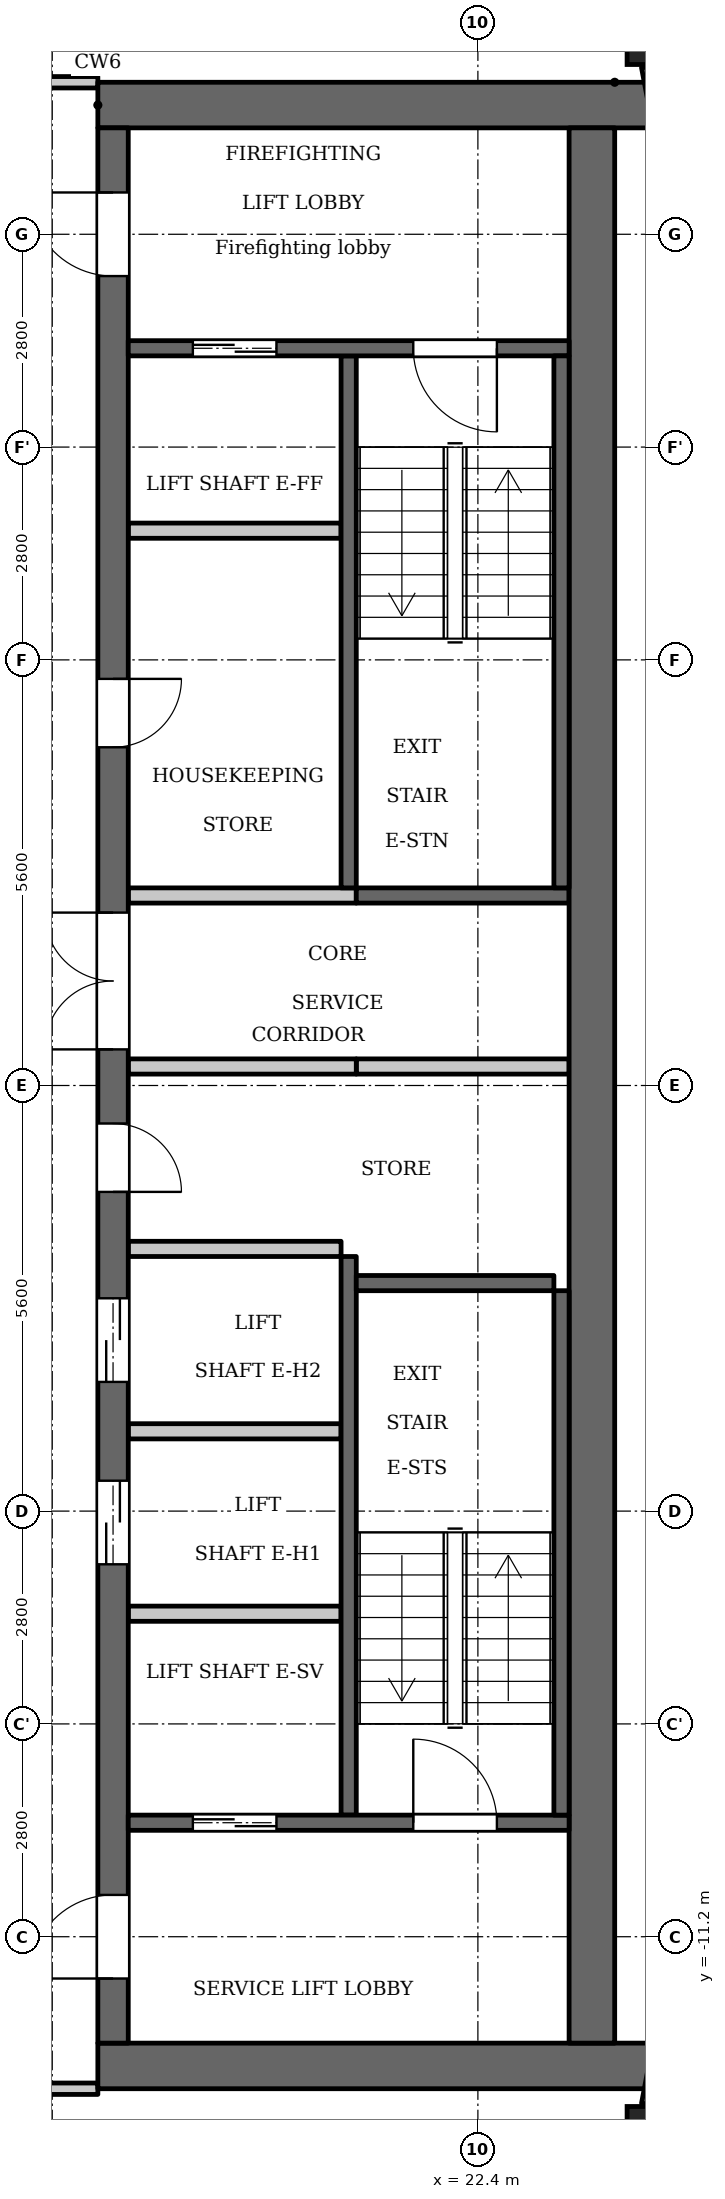
"""IFC4 building model, lengths in metres.
Left out: names, types, materials, properties, quantities, classifications, styles, units other than length and angle.
Written with IfcOpenShell. Run it as: python <this file> out.ifc"""

import sys

from ifc_helpers import new_model, si_unit, direction, frame, frame_2d, origin, origin_2d, place, context, subcontext, project, spatial, rectangle, extrude, element, fill, save


model = new_model("IFC4")
c1 = context("Model", 3, precision=1e-05, world=origin(), true_north=direction((0.0, 1.0)))
c2 = subcontext(c1, "Body", "Model", "MODEL_VIEW")
j1 = project(units=[si_unit("LENGTHUNIT", "METRE"), si_unit("PLANEANGLEUNIT", "RADIAN")], contexts=[c1])
p1 = place(None, origin())
s1 = spatial("IfcSite", under=j1, at=p1, CompositionType="ELEMENT")
p2 = place(p1, origin())
s2 = spatial("IfcBuilding", under=s1, at=p2, CompositionType="ELEMENT")
p3 = place(p2, frame((0.0, 0.0, 273.2)))
s3 = spatial("IfcBuildingStorey", under=s2, at=p3, CompositionType="ELEMENT", Elevation=273.2)
for number, where, z_axis, x_axis in (
    (1, (24.738, -13.809, 0.0), (0.0, 0.0, 1.0), (1.0, 0.0, 0.0)),
    (2, (24.738, 13.809, 0.0), (0.0, 0.0, 1.0), (1.0, 0.0, 0.0)),
):
    element("IfcColumn", number, at=place(p3, frame(where, z_axis=z_axis, x_axis=x_axis)), inside=s3, PredefinedType="COLUMN", context=c2, shape_type="SweptSolid", body=[
        extrude(rectangle(XDim=0.75, YDim=0.75, at=origin_2d()), origin(), (0.0, 0.0, 1.0), 3.5),
    ])
for number, where, z_axis, x_axis in (
    (3, (24.7, -13.42, 0.0), (0.0, 0.0, 1.0), (0.187, 0.982, 0.0)),
    (4, (25.053, 11.572, 0.0), (0.0, 0.0, 1.0), (-0.187, 0.982, 0.0)),
):
    element("IfcWall", number, at=place(p3, frame(where, z_axis=z_axis, x_axis=x_axis)), inside=s3, PredefinedType="SOLIDWALL", context=c2, shape_type="SweptSolid", body=[
        extrude(rectangle(XDim=1.881, YDim=0.3, at=frame_2d((0.941, 0.0))), origin(), (0.0, 0.0, 1.0), 2.55),
    ])
p4 = place(p3, frame((20.7, 2.6, 0.0), z_axis=(0.0, 0.0, 1.0), x_axis=(0.0, 1.0, 0.0)))
e5 = element("IfcWall", 5, at=p4, inside=s3, PredefinedType="SHEAR", context=c2, shape_type="SweptSolid", body=[
    extrude(rectangle(XDim=7.0, YDim=0.2, at=frame_2d((3.5, 0.0))), origin(), (0.0, 0.0, 1.0), 3.2),
])
p5 = place(p3, frame((20.7, -9.6, 0.0), z_axis=(0.0, 0.0, 1.0), x_axis=(0.0, 1.0, 0.0)))
e6 = element("IfcWall", 6, at=p5, inside=s3, PredefinedType="SHEAR", context=c2, shape_type="SweptSolid", body=[
    extrude(rectangle(XDim=7.35, YDim=0.2, at=frame_2d((3.675, 0.0))), origin(), (0.0, 0.0, 1.0), 3.2),
])
p6 = place(p3, frame((20.8, 2.5, 0.0), z_axis=(0.0, 0.0, 1.0), x_axis=(1.0, 0.0, 0.0)))
e7 = element("IfcWall", 7, at=p6, inside=s3, PredefinedType="SHEAR", context=c2, shape_type="SweptSolid", body=[
    extrude(rectangle(XDim=2.8, YDim=0.2, at=frame_2d((1.4, 0.0))), origin(), (0.0, 0.0, 1.0), 3.2),
])
p7 = place(p3, frame((20.8, 0.25, 0.0), z_axis=(0.0, 0.0, 1.0), x_axis=(1.0, 0.0, 0.0)))
e8 = element("IfcWall", 8, at=p7, inside=s3, PredefinedType="PARTITIONING", context=c2, shape_type="SweptSolid", body=[
    extrude(rectangle(XDim=2.8, YDim=0.2, at=frame_2d((1.4, 0.0))), origin(), (0.0, 0.0, 1.0), 3.2),
])
for number, where, z_axis, x_axis in (
    (9, (17.4, 12.9, 0.0), (0.0, 0.0, 1.0), (1.0, 0.0, 0.0)),
    (10, (17.4, -12.9, 0.0), (0.0, 0.0, 1.0), (1.0, 0.0, 0.0)),
):
    element("IfcWall", number, at=place(p3, frame(where, z_axis=z_axis, x_axis=x_axis)), inside=s3, PredefinedType="SHEAR", context=c2, shape_type="SweptSolid", body=[
        extrude(rectangle(XDim=7.32, YDim=0.6, at=frame_2d((3.66, 0.0))), origin(), (0.0, 0.0, 1.0), 3.2),
    ])
p8 = place(p3, frame((17.6, -12.6, 0.0), z_axis=(0.0, 0.0, 1.0), x_axis=(0.0, 1.0, 0.0)))
e11 = element("IfcWall", 11, at=p8, inside=s3, PredefinedType="SHEAR", context=c2, shape_type="SweptSolid", body=[
    extrude(rectangle(XDim=25.2, YDim=0.4, at=frame_2d((12.6, 0.0))), origin(), (0.0, 0.0, 1.0), 3.2),
])
p9 = place(p8, frame((6.3, 0.0, 0.0)))
e12 = element("IfcOpeningElement", 12, at=p9, cuts=e11, PredefinedType="OPENING", context=c2, shape_type="SweptSolid", body=[
    extrude(rectangle(XDim=1.1, YDim=2.1, at=frame_2d((0.55, 1.05))), frame((0.0, 0.21, 0.0), z_axis=(0.0, -1.0, 0.0), x_axis=(1.0, 0.0, 0.0)), (0.0, 0.0, 1.0), 0.42),
])
p10 = place(p8, frame((8.7, 0.0, 0.0)))
e13 = element("IfcOpeningElement", 13, at=p10, cuts=e11, PredefinedType="OPENING", context=c2, shape_type="SweptSolid", body=[
    extrude(rectangle(XDim=1.1, YDim=2.1, at=frame_2d((0.55, 1.05))), frame((0.0, 0.21, 0.0), z_axis=(0.0, -1.0, 0.0), x_axis=(1.0, 0.0, 0.0)), (0.0, 0.0, 1.0), 0.42),
])
p11 = place(p8, frame((11.2, 0.0, 0.0)))
e14 = element("IfcOpeningElement", 14, at=p11, cuts=e11, PredefinedType="OPENING", context=c2, shape_type="SweptSolid", body=[
    extrude(rectangle(XDim=0.9, YDim=2.1, at=frame_2d((0.45, 1.05))), frame((0.0, 0.21, 0.0), z_axis=(0.0, -1.0, 0.0), x_axis=(1.0, 0.0, 0.0)), (0.0, 0.0, 1.0), 0.42),
])
p12 = place(p8, frame((17.05, 0.0, 0.0)))
e15 = element("IfcOpeningElement", 15, at=p12, cuts=e11, PredefinedType="OPENING", context=c2, shape_type="SweptSolid", body=[
    extrude(rectangle(XDim=0.9, YDim=2.1, at=frame_2d((0.45, 1.05))), frame((0.0, 0.21, 0.0), z_axis=(0.0, -1.0, 0.0), x_axis=(1.0, 0.0, 0.0)), (0.0, 0.0, 1.0), 0.42),
])
p13 = place(p8, frame((23.25, 0.0, 0.0)))
e16 = element("IfcOpeningElement", 16, at=p13, cuts=e11, PredefinedType="OPENING", context=c2, shape_type="SweptSolid", body=[
    extrude(rectangle(XDim=1.1, YDim=2.1, at=frame_2d((0.55, 1.05))), frame((0.0, 0.21, 0.0), z_axis=(0.0, -1.0, 0.0), x_axis=(1.0, 0.0, 0.0)), (0.0, 0.0, 1.0), 0.42),
])
p14 = place(p8, frame((0.85, 0.0, 0.0)))
e17 = element("IfcOpeningElement", 17, at=p14, cuts=e11, PredefinedType="OPENING", context=c2, shape_type="SweptSolid", body=[
    extrude(rectangle(XDim=1.1, YDim=2.1, at=frame_2d((0.55, 1.05))), frame((0.0, 0.21, 0.0), z_axis=(0.0, -1.0, 0.0), x_axis=(1.0, 0.0, 0.0)), (0.0, 0.0, 1.0), 0.42),
])
p15 = place(p8, frame((13.075, 0.0, 0.0)))
e18 = element("IfcOpeningElement", 18, at=p15, cuts=e11, PredefinedType="OPENING", context=c2, shape_type="SweptSolid", body=[
    extrude(rectangle(XDim=1.8, YDim=2.1, at=frame_2d((0.9, 1.05))), frame((0.0, 0.21, 0.0), z_axis=(0.0, -1.0, 0.0), x_axis=(1.0, 0.0, 0.0)), (0.0, 0.0, 1.0), 0.42),
])
p16 = place(p3, frame((23.9, -12.6, 0.0), z_axis=(0.0, 0.0, 1.0), x_axis=(0.0, 1.0, 0.0)))
e19 = element("IfcWall", 19, at=p16, inside=s3, PredefinedType="SHEAR", context=c2, shape_type="SweptSolid", body=[
    extrude(rectangle(XDim=25.2, YDim=0.6, at=frame_2d((12.6, 0.0))), origin(), (0.0, 0.0, 1.0), 3.2),
])
p17 = place(p3, frame((17.8, -9.7, 0.0), z_axis=(0.0, 0.0, 1.0), x_axis=(1.0, 0.0, 0.0)))
e20 = element("IfcWall", 20, at=p17, inside=s3, PredefinedType="SHEAR", context=c2, shape_type="SweptSolid", body=[
    extrude(rectangle(XDim=5.8, YDim=0.2, at=frame_2d((2.9, 0.0))), origin(), (0.0, 0.0, 1.0), 3.2),
])
p18 = place(p17, frame((0.85, 0.0, 0.0)))
e21 = element("IfcOpeningElement", 21, at=p18, cuts=e20, PredefinedType="OPENING", context=c2, shape_type="SweptSolid", body=[
    extrude(rectangle(XDim=1.1, YDim=2.1, at=frame_2d((0.55, 1.05))), frame((0.0, 0.11, 0.0), z_axis=(0.0, -1.0, 0.0), x_axis=(1.0, 0.0, 0.0)), (0.0, 0.0, 1.0), 0.22),
])
p19 = place(p17, frame((3.75, 0.0, 0.0)))
e22 = element("IfcOpeningElement", 22, at=p19, cuts=e20, PredefinedType="OPENING", context=c2, shape_type="SweptSolid", body=[
    extrude(rectangle(XDim=1.1, YDim=2.1, at=frame_2d((0.55, 1.05))), frame((0.0, 0.11, 0.0), z_axis=(0.0, -1.0, 0.0), x_axis=(1.0, 0.0, 0.0)), (0.0, 0.0, 1.0), 0.22),
])
for number, where, z_axis, x_axis in (
    (23, (17.8, -6.95, 0.0), (0.0, 0.0, 1.0), (1.0, 0.0, 0.0)),
    (24, (17.8, -4.55, 0.0), (0.0, 0.0, 1.0), (1.0, 0.0, 0.0)),
    (25, (17.8, -2.15, 0.0), (0.0, 0.0, 1.0), (1.0, 0.0, 0.0)),
):
    element("IfcWall", number, at=place(p3, frame(where, z_axis=z_axis, x_axis=x_axis)), inside=s3, PredefinedType="PARTITIONING", context=c2, shape_type="SweptSolid", body=[
        extrude(rectangle(XDim=2.8, YDim=0.2, at=frame_2d((1.4, 0.0))), origin(), (0.0, 0.0, 1.0), 3.2),
    ])
for number, where, z_axis, x_axis in (
    (26, (17.8, 0.25, 0.0), (0.0, 0.0, 1.0), (1.0, 0.0, 0.0)),
    (27, (17.8, 2.5, 0.0), (0.0, 0.0, 1.0), (1.0, 0.0, 0.0)),
):
    element("IfcWall", number, at=place(p3, frame(where, z_axis=z_axis, x_axis=x_axis)), inside=s3, PredefinedType="PARTITIONING", context=c2, shape_type="SweptSolid", body=[
        extrude(rectangle(XDim=3.0, YDim=0.2, at=frame_2d((1.5, 0.0))), origin(), (0.0, 0.0, 1.0), 3.2),
    ])
p20 = place(p3, frame((17.8, 7.3, 0.0), z_axis=(0.0, 0.0, 1.0), x_axis=(1.0, 0.0, 0.0)))
e28 = element("IfcWall", 28, at=p20, inside=s3, PredefinedType="PARTITIONING", context=c2, shape_type="SweptSolid", body=[
    extrude(rectangle(XDim=2.8, YDim=0.2, at=frame_2d((1.4, 0.0))), origin(), (0.0, 0.0, 1.0), 3.2),
])
p21 = place(p3, frame((17.8, 9.7, 0.0), z_axis=(0.0, 0.0, 1.0), x_axis=(1.0, 0.0, 0.0)))
e29 = element("IfcWall", 29, at=p21, inside=s3, PredefinedType="SHEAR", context=c2, shape_type="SweptSolid", body=[
    extrude(rectangle(XDim=5.8, YDim=0.2, at=frame_2d((2.9, 0.0))), origin(), (0.0, 0.0, 1.0), 3.2),
])
p22 = place(p21, frame((0.85, 0.0, 0.0)))
e30 = element("IfcOpeningElement", 30, at=p22, cuts=e29, PredefinedType="OPENING", context=c2, shape_type="SweptSolid", body=[
    extrude(rectangle(XDim=1.1, YDim=2.1, at=frame_2d((0.55, 1.05))), frame((0.0, 0.11, 0.0), z_axis=(0.0, -1.0, 0.0), x_axis=(1.0, 0.0, 0.0)), (0.0, 0.0, 1.0), 0.22),
])
p23 = place(p21, frame((3.75, 0.0, 0.0)))
e31 = element("IfcOpeningElement", 31, at=p23, cuts=e29, PredefinedType="OPENING", context=c2, shape_type="SweptSolid", body=[
    extrude(rectangle(XDim=1.1, YDim=2.1, at=frame_2d((0.55, 1.05))), frame((0.0, 0.11, 0.0), z_axis=(0.0, -1.0, 0.0), x_axis=(1.0, 0.0, 0.0)), (0.0, 0.0, 1.0), 0.22),
])
p24 = place(p3, frame((23.5, 2.6, 0.0), z_axis=(0.0, 0.0, 1.0), x_axis=(0.0, 1.0, 0.0)))
e32 = element("IfcWall", 32, at=p24, inside=s3, PredefinedType="SHEAR", context=c2, shape_type="SweptSolid", body=[
    extrude(rectangle(XDim=7.0, YDim=0.2, at=frame_2d((3.5, 0.0))), origin(), (0.0, 0.0, 1.0), 3.2),
])
p25 = place(p3, frame((23.5, -9.6, 0.0), z_axis=(0.0, 0.0, 1.0), x_axis=(0.0, 1.0, 0.0)))
e33 = element("IfcWall", 33, at=p25, inside=s3, PredefinedType="SHEAR", context=c2, shape_type="SweptSolid", body=[
    extrude(rectangle(XDim=6.9, YDim=0.2, at=frame_2d((3.45, 0.0))), origin(), (0.0, 0.0, 1.0), 3.2),
])
p26 = place(p3, frame((20.8, -2.6, 0.0), z_axis=(0.0, 0.0, 1.0), x_axis=(1.0, 0.0, 0.0)))
e34 = element("IfcWall", 34, at=p26, inside=s3, PredefinedType="SHEAR", context=c2, shape_type="SweptSolid", body=[
    extrude(rectangle(XDim=2.6, YDim=0.2, at=frame_2d((1.3, 0.0))), origin(), (0.0, 0.0, 1.0), 3.2),
])
p27 = place(p3, frame((15.075, -13.2, 0.0), z_axis=(0.0, 0.0, 1.0), x_axis=(1.0, 0.0, 0.0)))
e35 = element("IfcWall", 35, at=p27, inside=s3, PredefinedType="PARTITIONING", context=c2, shape_type="SweptSolid", body=[
    extrude(rectangle(XDim=2.325, YDim=0.15, at=frame_2d((1.163, 0.0))), origin(), (0.0, 0.0, 1.0), 3.2),
])
p28 = place(p27, frame((0.575, 0.0, 0.0)))
e36 = element("IfcOpeningElement", 36, at=p28, cuts=e35, PredefinedType="OPENING", context=c2, shape_type="SweptSolid", body=[
    extrude(rectangle(XDim=1.0, YDim=2.1, at=frame_2d((0.5, 1.05))), frame((0.0, 0.085, 0.0), z_axis=(0.0, -1.0, 0.0), x_axis=(1.0, 0.0, 0.0)), (0.0, 0.0, 1.0), 0.17),
])
p29 = place(p3, frame((15.075, 13.2, 0.0), z_axis=(0.0, 0.0, 1.0), x_axis=(1.0, 0.0, 0.0)))
e37 = element("IfcWall", 37, at=p29, inside=s3, PredefinedType="PARTITIONING", context=c2, shape_type="SweptSolid", body=[
    extrude(rectangle(XDim=2.325, YDim=0.15, at=frame_2d((1.163, 0.0))), origin(), (0.0, 0.0, 1.0), 3.2),
])
p30 = place(p29, frame((0.675, 0.0, 0.0)))
e38 = element("IfcOpeningElement", 38, at=p30, cuts=e37, PredefinedType="OPENING", context=c2, shape_type="SweptSolid", body=[
    extrude(rectangle(XDim=1.0, YDim=2.1, at=frame_2d((0.5, 1.05))), frame((0.0, 0.085, 0.0), z_axis=(0.0, -1.0, 0.0), x_axis=(1.0, 0.0, 0.0)), (0.0, 0.0, 1.0), 0.17),
])
p31 = place(p18, origin())
e39 = element("IfcDoor", 39, at=p31, inside=s3, OperationType="DOUBLE_DOOR_SLIDING", PredefinedType="DOOR", context=c2, shape_type="SweptSolid", body=[
    extrude(rectangle(XDim=1.1, YDim=2.1, at=frame_2d((0.55, 1.05))), frame((0.0, 0.025, 0.0), z_axis=(0.0, -1.0, 0.0), x_axis=(1.0, 0.0, 0.0)), (0.0, 0.0, 1.0), 0.05),
])
fill(e21, e39)
p32 = place(p9, origin())
e40 = element("IfcDoor", 40, at=p32, inside=s3, OperationType="DOUBLE_DOOR_SLIDING", PredefinedType="DOOR", context=c2, shape_type="SweptSolid", body=[
    extrude(rectangle(XDim=1.1, YDim=2.1, at=frame_2d((0.55, 1.05))), frame((0.0, 0.025, 0.0), z_axis=(0.0, -1.0, 0.0), x_axis=(1.0, 0.0, 0.0)), (0.0, 0.0, 1.0), 0.05),
])
fill(e12, e40)
p33 = place(p10, origin())
e41 = element("IfcDoor", 41, at=p33, inside=s3, OperationType="DOUBLE_DOOR_SLIDING", PredefinedType="DOOR", context=c2, shape_type="SweptSolid", body=[
    extrude(rectangle(XDim=1.1, YDim=2.1, at=frame_2d((0.55, 1.05))), frame((0.0, 0.025, 0.0), z_axis=(0.0, -1.0, 0.0), x_axis=(1.0, 0.0, 0.0)), (0.0, 0.0, 1.0), 0.05),
])
fill(e13, e41)
p34 = place(p11, origin())
e42 = element("IfcDoor", 42, at=p34, inside=s3, OperationType="SINGLE_SWING_LEFT", PredefinedType="DOOR", context=c2, shape_type="SweptSolid", body=[
    extrude(rectangle(XDim=0.9, YDim=2.1, at=frame_2d((0.45, 1.05))), frame((0.0, 0.025, 0.0), z_axis=(0.0, -1.0, 0.0), x_axis=(1.0, 0.0, 0.0)), (0.0, 0.0, 1.0), 0.05),
])
fill(e14, e42)
p35 = place(p12, origin())
e43 = element("IfcDoor", 43, at=p35, inside=s3, OperationType="SINGLE_SWING_RIGHT", PredefinedType="DOOR", context=c2, shape_type="SweptSolid", body=[
    extrude(rectangle(XDim=0.9, YDim=2.1, at=frame_2d((0.45, 1.05))), frame((0.0, 0.025, 0.0), z_axis=(0.0, -1.0, 0.0), x_axis=(1.0, 0.0, 0.0)), (0.0, 0.0, 1.0), 0.05),
])
fill(e15, e43)
p36 = place(p22, origin())
e44 = element("IfcDoor", 44, at=p36, inside=s3, OperationType="DOUBLE_DOOR_SLIDING", PredefinedType="DOOR", context=c2, shape_type="SweptSolid", body=[
    extrude(rectangle(XDim=1.1, YDim=2.1, at=frame_2d((0.55, 1.05))), frame((0.0, 0.025, 0.0), z_axis=(0.0, -1.0, 0.0), x_axis=(1.0, 0.0, 0.0)), (0.0, 0.0, 1.0), 0.05),
])
fill(e30, e44)
p37 = place(p13, origin())
e45 = element("IfcDoor", 45, at=p37, inside=s3, OperationType="SINGLE_SWING_LEFT", PredefinedType="DOOR", context=c2, shape_type="SweptSolid", body=[
    extrude(rectangle(XDim=1.1, YDim=2.1, at=frame_2d((0.55, 1.05))), frame((0.0, 0.025, 0.0), z_axis=(0.0, -1.0, 0.0), x_axis=(1.0, 0.0, 0.0)), (0.0, 0.0, 1.0), 0.05),
])
fill(e16, e45)
p38 = place(p14, origin())
e46 = element("IfcDoor", 46, at=p38, inside=s3, OperationType="SINGLE_SWING_RIGHT", PredefinedType="DOOR", context=c2, shape_type="SweptSolid", body=[
    extrude(rectangle(XDim=1.1, YDim=2.1, at=frame_2d((0.55, 1.05))), frame((0.0, 0.025, 0.0), z_axis=(0.0, -1.0, 0.0), x_axis=(1.0, 0.0, 0.0)), (0.0, 0.0, 1.0), 0.05),
])
fill(e17, e46)
p39 = place(p23, origin())
e47 = element("IfcDoor", 47, at=p39, inside=s3, OperationType="SINGLE_SWING_RIGHT", PredefinedType="DOOR", context=c2, shape_type="SweptSolid", body=[
    extrude(rectangle(XDim=1.1, YDim=2.1, at=frame_2d((0.55, 1.05))), frame((0.0, 0.025, 0.0), z_axis=(0.0, -1.0, 0.0), x_axis=(1.0, 0.0, 0.0)), (0.0, 0.0, 1.0), 0.05),
])
fill(e31, e47)
p40 = place(p19, origin())
e48 = element("IfcDoor", 48, at=p40, inside=s3, OperationType="SINGLE_SWING_RIGHT", PredefinedType="DOOR", context=c2, shape_type="SweptSolid", body=[
    extrude(rectangle(XDim=1.1, YDim=2.1, at=frame_2d((0.55, 1.05))), frame((0.0, 0.025, 0.0), z_axis=(0.0, -1.0, 0.0), x_axis=(1.0, 0.0, 0.0)), (0.0, 0.0, 1.0), 0.05),
])
fill(e22, e48)
p41 = place(p15, origin())
e49 = element("IfcDoor", 49, at=p41, inside=s3, OperationType="DOUBLE_DOOR_SINGLE_SWING", PredefinedType="DOOR", context=c2, shape_type="SweptSolid", body=[
    extrude(rectangle(XDim=1.8, YDim=2.1, at=frame_2d((0.9, 1.05))), frame((0.0, 0.025, 0.0), z_axis=(0.0, -1.0, 0.0), x_axis=(1.0, 0.0, 0.0)), (0.0, 0.0, 1.0), 0.05),
])
fill(e18, e49)
save(model, sys.argv[1])
